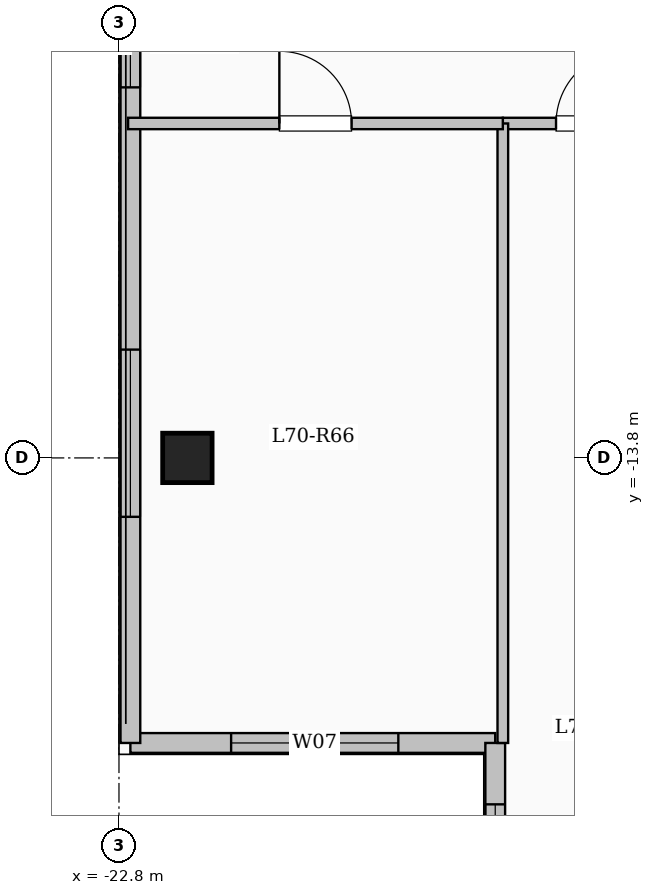
"""IFC4 building model, lengths in metres.
Left out: names, types, materials, properties, quantities, classifications, styles, units other than length and angle.
Written with IfcOpenShell. Run it as: python <this file> out.ifc"""

import sys

from ifc_helpers import new_model, si_unit, direction, frame, frame_2d, origin, origin_2d, place, context, subcontext, project, spatial, rectangle, extrude, element, fill, save


model = new_model("IFC4")
c1 = context("Model", 3, precision=1e-05, world=origin(), true_north=direction((0.0, 1.0)))
c2 = subcontext(c1, "Body", "Model", "MODEL_VIEW")
j1 = project(units=[si_unit("LENGTHUNIT", "METRE"), si_unit("PLANEANGLEUNIT", "RADIAN")], contexts=[c1])
p1 = place(None, origin())
s1 = spatial("IfcSite", under=j1, at=p1, CompositionType="ELEMENT")
p2 = place(p1, origin())
s2 = spatial("IfcBuilding", under=s1, at=p2, CompositionType="ELEMENT")
p3 = place(p2, frame((0.0, 0.0, 258.25)))
s3 = spatial("IfcBuildingStorey", under=s2, at=p3, CompositionType="ELEMENT", Elevation=258.25)
p4 = place(p3, frame((-21.9, -13.8, 0.0), z_axis=(0.0, 0.0, 1.0), x_axis=(1.0, 0.0, 0.0)))
e1 = element("IfcColumn", 1, at=p4, inside=s3, PredefinedType="COLUMN", context=c2, shape_type="SweptSolid", body=[
    extrude(rectangle(XDim=0.65, YDim=0.65, at=origin_2d()), origin(), (0.0, 0.0, 1.0), 3.35),
])
p5 = place(p3, frame((-17.85, -17.55, 0.0), z_axis=(0.0, 0.0, 1.0), x_axis=(-1.0, 0.0, 0.0)))
e2 = element("IfcWall", 2, at=p5, inside=s3, PredefinedType="SOLIDWALL", context=c2, shape_type="SweptSolid", body=[
    extrude(rectangle(XDim=4.8, YDim=0.26, at=frame_2d((2.4, 0.0))), origin(), (0.0, 0.0, 1.0), 3.1),
])
p6 = place(p5, frame((1.275, 0.0, 0.9)))
e3 = element("IfcOpeningElement", 3, at=p6, cuts=e2, PredefinedType="OPENING", context=c2, shape_type="SweptSolid", body=[
    extrude(rectangle(XDim=2.2, YDim=1.75, at=frame_2d((1.1, 0.875))), frame((0.0, 0.14, 0.0), z_axis=(0.0, -1.0, 0.0), x_axis=(1.0, 0.0, 0.0)), (0.0, 0.0, 1.0), 0.28),
])
p7 = place(p3, frame((-22.65, -17.55, 0.0), z_axis=(0.0, 0.0, 1.0), x_axis=(0.0, 1.0, 0.0)))
e4 = element("IfcWall", 4, at=p7, inside=s3, PredefinedType="SOLIDWALL", context=c2, shape_type="SweptSolid", body=[
    extrude(rectangle(XDim=35.1, YDim=0.26, at=frame_2d((17.55, 0.0))), origin(), (0.0, 0.0, 1.0), 3.1),
])
p8 = place(p7, frame((2.975, 0.0, 0.9)))
e5 = element("IfcOpeningElement", 5, at=p8, cuts=e4, PredefinedType="OPENING", context=c2, shape_type="SweptSolid", body=[
    extrude(rectangle(XDim=2.2, YDim=1.75, at=frame_2d((1.1, 0.875))), frame((0.0, 0.14, 0.0), z_axis=(0.0, -1.0, 0.0), x_axis=(1.0, 0.0, 0.0)), (0.0, 0.0, 1.0), 0.28),
])
p9 = place(p7, frame((8.625, 0.0, 0.95)))
e6 = element("IfcOpeningElement", 6, at=p9, cuts=e4, PredefinedType="OPENING", context=c2, shape_type="SweptSolid", body=[
    extrude(rectangle(XDim=1.2, YDim=1.5, at=frame_2d((0.6, 0.75))), frame((0.0, 0.14, 0.0), z_axis=(0.0, -1.0, 0.0), x_axis=(1.0, 0.0, 0.0)), (0.0, 0.0, 1.0), 0.28),
])
p10 = place(p7, frame((18.3, 0.0, 0.9)))
e7 = element("IfcOpeningElement", 7, at=p10, cuts=e4, PredefinedType="OPENING", context=c2, shape_type="SweptSolid", body=[
    extrude(rectangle(XDim=2.0, YDim=1.7, at=frame_2d((1.0, 0.85))), frame((0.0, 0.14, 0.0), z_axis=(0.0, -1.0, 0.0), x_axis=(1.0, 0.0, 0.0)), (0.0, 0.0, 1.0), 0.28),
])
p11 = place(p7, frame((28.675, 0.0, 0.95)))
e8 = element("IfcOpeningElement", 8, at=p11, cuts=e4, PredefinedType="OPENING", context=c2, shape_type="SweptSolid", body=[
    extrude(rectangle(XDim=1.0, YDim=1.5, at=frame_2d((0.5, 0.75))), frame((0.0, 0.14, 0.0), z_axis=(0.0, -1.0, 0.0), x_axis=(1.0, 0.0, 0.0)), (0.0, 0.0, 1.0), 0.28),
])
p12 = place(p7, frame((31.6, 0.0, 0.9)))
e9 = element("IfcOpeningElement", 9, at=p12, cuts=e4, PredefinedType="OPENING", context=c2, shape_type="SweptSolid", body=[
    extrude(rectangle(XDim=2.0, YDim=1.7, at=frame_2d((1.0, 0.85))), frame((0.0, 0.14, 0.0), z_axis=(0.0, -1.0, 0.0), x_axis=(1.0, 0.0, 0.0)), (0.0, 0.0, 1.0), 0.28),
])
p13 = place(p3, frame((-17.85, -20.85, 0.0), z_axis=(0.0, 0.0, 1.0), x_axis=(0.0, 1.0, 0.0)))
e10 = element("IfcWall", 10, at=p13, inside=s3, PredefinedType="SOLIDWALL", context=c2, shape_type="SweptSolid", body=[
    extrude(rectangle(XDim=3.3, YDim=0.26, at=frame_2d((1.65, 0.0))), origin(), (0.0, 0.0, 1.0), 3.1),
])
p14 = place(p13, frame((0.843, 0.0, 0.9)))
e11 = element("IfcOpeningElement", 11, at=p14, cuts=e10, PredefinedType="OPENING", context=c2, shape_type="SweptSolid", body=[
    extrude(rectangle(XDim=1.65, YDim=1.6, at=frame_2d((0.825, 0.8))), frame((0.0, 0.14, 0.0), z_axis=(0.0, -1.0, 0.0), x_axis=(1.0, 0.0, 0.0)), (0.0, 0.0, 1.0), 0.28),
])
p15 = place(p3, frame((-17.75, -9.4, 0.0), z_axis=(0.0, 0.0, 1.0), x_axis=(1.0, 0.0, 0.0)))
e12 = element("IfcWall", 12, at=p15, inside=s3, PredefinedType="PARTITIONING", context=c2, shape_type="SweptSolid", body=[
    extrude(rectangle(XDim=9.2, YDim=0.15, at=frame_2d((4.6, 0.0))), origin(), (0.0, 0.0, 1.0), 3.1),
])
p16 = place(p15, frame((0.7, 0.0, 0.0)))
e13 = element("IfcOpeningElement", 13, at=p16, cuts=e12, PredefinedType="OPENING", context=c2, shape_type="SweptSolid", body=[
    extrude(rectangle(XDim=0.96, YDim=2.15, at=frame_2d((0.48, 1.075))), frame((0.0, 0.085, 0.0), z_axis=(0.0, -1.0, 0.0), x_axis=(1.0, 0.0, 0.0)), (0.0, 0.0, 1.0), 0.17),
])
p17 = place(p15, frame((5.275, 0.0, 0.0)))
e14 = element("IfcOpeningElement", 14, at=p17, cuts=e12, PredefinedType="OPENING", context=c2, shape_type="SweptSolid", body=[
    extrude(rectangle(XDim=0.96, YDim=2.15, at=frame_2d((0.48, 1.075))), frame((0.0, 0.085, 0.0), z_axis=(0.0, -1.0, 0.0), x_axis=(1.0, 0.0, 0.0)), (0.0, 0.0, 1.0), 0.17),
])
p18 = place(p3, frame((-17.75, -17.55, 0.0), z_axis=(0.0, 0.0, 1.0), x_axis=(0.0, 1.0, 0.0)))
e15 = element("IfcWall", 15, at=p18, inside=s3, PredefinedType="PARTITIONING", context=c2, shape_type="SweptSolid", body=[
    extrude(rectangle(XDim=8.15, YDim=0.14, at=frame_2d((4.075, 0.0))), origin(), (0.0, 0.0, 1.0), 3.1),
])
p19 = place(p3, frame((-22.68, -9.4, 0.0), z_axis=(0.0, 0.0, 1.0), x_axis=(1.0, 0.0, 0.0)))
e16 = element("IfcWall", 16, at=p19, inside=s3, PredefinedType="PARTITIONING", context=c2, shape_type="SweptSolid", body=[
    extrude(rectangle(XDim=4.93, YDim=0.15, at=frame_2d((2.465, 0.0))), origin(), (0.0, 0.0, 1.0), 3.1),
])
p20 = place(p19, frame((1.99, 0.0, 0.0)))
e17 = element("IfcOpeningElement", 17, at=p20, cuts=e16, PredefinedType="OPENING", context=c2, shape_type="SweptSolid", body=[
    extrude(rectangle(XDim=0.95, YDim=2.15, at=frame_2d((0.475, 1.075))), frame((0.0, 0.085, 0.0), z_axis=(0.0, -1.0, 0.0), x_axis=(1.0, 0.0, 0.0)), (0.0, 0.0, 1.0), 0.17),
])
p21 = place(p6, origin())
e18 = element("IfcWindow", 18, at=p21, inside=s3, PartitioningType="SINGLE_PANEL", PredefinedType="WINDOW", context=c2, shape_type="SweptSolid", body=[
    extrude(rectangle(XDim=2.2, YDim=1.75, at=frame_2d((1.1, 0.875))), frame((0.0, 0.03, 0.0), z_axis=(0.0, -1.0, 0.0), x_axis=(1.0, 0.0, 0.0)), (0.0, 0.0, 1.0), 0.06),
])
fill(e3, e18)
p22 = place(p8, origin())
e19 = element("IfcWindow", 19, at=p22, inside=s3, PartitioningType="SINGLE_PANEL", PredefinedType="WINDOW", context=c2, shape_type="SweptSolid", body=[
    extrude(rectangle(XDim=2.2, YDim=1.75, at=frame_2d((1.1, 0.875))), frame((0.0, 0.03, 0.0), z_axis=(0.0, -1.0, 0.0), x_axis=(1.0, 0.0, 0.0)), (0.0, 0.0, 1.0), 0.06),
])
fill(e5, e19)
p23 = place(p9, origin())
e20 = element("IfcWindow", 20, at=p23, inside=s3, PartitioningType="SINGLE_PANEL", PredefinedType="WINDOW", context=c2, shape_type="SweptSolid", body=[
    extrude(rectangle(XDim=1.2, YDim=1.5, at=frame_2d((0.6, 0.75))), frame((0.0, 0.03, 0.0), z_axis=(0.0, -1.0, 0.0), x_axis=(1.0, 0.0, 0.0)), (0.0, 0.0, 1.0), 0.06),
])
fill(e6, e20)
p24 = place(p14, origin())
e21 = element("IfcWindow", 21, at=p24, inside=s3, PartitioningType="SINGLE_PANEL", PredefinedType="WINDOW", context=c2, shape_type="SweptSolid", body=[
    extrude(rectangle(XDim=1.65, YDim=1.6, at=frame_2d((0.825, 0.8))), frame((0.0, 0.03, 0.0), z_axis=(0.0, -1.0, 0.0), x_axis=(1.0, 0.0, 0.0)), (0.0, 0.0, 1.0), 0.06),
])
fill(e11, e21)
p25 = place(p16, origin())
e22 = element("IfcDoor", 22, at=p25, inside=s3, OperationType="SINGLE_SWING_RIGHT", PredefinedType="DOOR", context=c2, shape_type="SweptSolid", body=[
    extrude(rectangle(XDim=0.96, YDim=2.15, at=frame_2d((0.48, 1.075))), frame((0.0, 0.025, 0.0), z_axis=(0.0, -1.0, 0.0), x_axis=(1.0, 0.0, 0.0)), (0.0, 0.0, 1.0), 0.05),
])
fill(e13, e22)
p26 = place(p20, origin())
e23 = element("IfcDoor", 23, at=p26, inside=s3, OperationType="SINGLE_SWING_LEFT", PredefinedType="DOOR", context=c2, shape_type="SweptSolid", body=[
    extrude(rectangle(XDim=0.95, YDim=2.15, at=frame_2d((0.475, 1.075))), frame((0.0, 0.025, 0.0), z_axis=(0.0, -1.0, 0.0), x_axis=(1.0, 0.0, 0.0)), (0.0, 0.0, 1.0), 0.05),
])
fill(e17, e23)
save(model, sys.argv[1])
